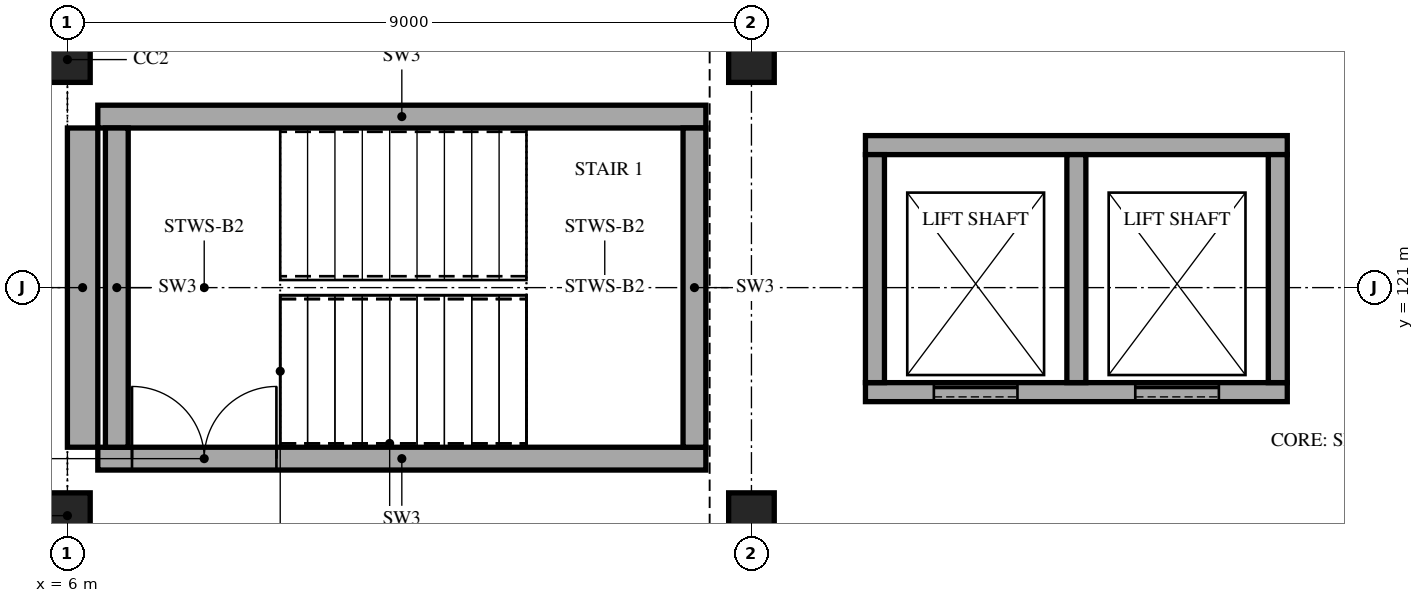
"""IFC4 building model, lengths in metres.
Left out: names, types, materials, properties, quantities, classifications, styles, units other than length and angle.
Written with IfcOpenShell. Run it as: python <this file> out.ifc"""

import sys

from ifc_helpers import new_model, si_unit, direction, frame, frame_2d, origin, origin_2d, place, context, subcontext, project, spatial, rectangle, extrude, element, fill, save


model = new_model("IFC4")
c1 = context("Model", 3, precision=1e-05, world=origin(), true_north=direction((0.0, 1.0)))
c2 = subcontext(c1, "Body", "Model", "MODEL_VIEW")
j1 = project(units=[si_unit("LENGTHUNIT", "METRE"), si_unit("PLANEANGLEUNIT", "RADIAN")], contexts=[c1])
p1 = place(None, origin())
s1 = spatial("IfcSite", under=j1, at=p1, CompositionType="ELEMENT")
p2 = place(p1, origin())
s2 = spatial("IfcBuilding", under=s1, at=p2, CompositionType="ELEMENT")
p3 = place(p2, frame((0.0, 0.0, -8.4)))
s3 = spatial("IfcBuildingStorey", under=s2, at=p3, CompositionType="ELEMENT", Elevation=-8.4)
for number, where, z_axis, x_axis in (
    (1, (6.0, 118.0, 0.0), (0.0, 0.0, 1.0), (1.0, 0.0, 0.0)),
    (2, (6.0, 124.0, 0.0), (0.0, 0.0, 1.0), (1.0, 0.0, 0.0)),
    (3, (15.0, 118.0, 0.0), (0.0, 0.0, 1.0), (1.0, 0.0, 0.0)),
    (4, (15.0, 124.0, 0.0), (0.0, 0.0, 1.0), (1.0, 0.0, 0.0)),
):
    element("IfcColumn", number, at=place(p3, frame(where, z_axis=z_axis, x_axis=x_axis)), inside=s3, PredefinedType="COLUMN", context=c2, shape_type="SweptSolid", body=[
        extrude(rectangle(XDim=0.6, YDim=0.6, at=origin_2d()), origin(), (0.0, 0.0, 1.0), 4.2),
    ])
p4 = place(p3, frame((6.4, 118.75, 0.0), z_axis=(0.0, 0.0, 1.0), x_axis=(1.0, 0.0, 0.0)))
e5 = element("IfcWall", 5, at=p4, inside=s3, PredefinedType="SHEAR", context=c2, shape_type="SweptSolid", body=[
    extrude(rectangle(XDim=8.0, YDim=0.3, at=frame_2d((4.0, 0.0))), origin(), (0.0, 0.0, 1.0), 4.2),
])
p5 = place(p4, frame((0.45, 0.0, 0.0)))
e6 = element("IfcOpeningElement", 6, at=p5, cuts=e5, PredefinedType="OPENING", context=c2, shape_type="SweptSolid", body=[
    extrude(rectangle(XDim=1.9, YDim=2.1, at=frame_2d((0.95, 1.05))), frame((0.0, 0.16, 0.0), z_axis=(0.0, -1.0, 0.0), x_axis=(1.0, 0.0, 0.0)), (0.0, 0.0, 1.0), 0.32),
])
p6 = place(p3, frame((6.4, 123.25, 0.0), z_axis=(0.0, 0.0, 1.0), x_axis=(1.0, 0.0, 0.0)))
e7 = element("IfcWall", 7, at=p6, inside=s3, PredefinedType="SHEAR", context=c2, shape_type="SweptSolid", body=[
    extrude(rectangle(XDim=8.0, YDim=0.3, at=frame_2d((4.0, 0.0))), origin(), (0.0, 0.0, 1.0), 4.2),
])
for number, where, z_axis, x_axis in (
    (8, (6.65, 118.9, 0.0), (0.0, 0.0, 1.0), (0.0, 1.0, 0.0)),
    (9, (14.25, 118.9, 0.0), (0.0, 0.0, 1.0), (0.0, 1.0, 0.0)),
):
    element("IfcWall", number, at=place(p3, frame(where, z_axis=z_axis, x_axis=x_axis)), inside=s3, PredefinedType="SHEAR", context=c2, shape_type="SweptSolid", body=[
        extrude(rectangle(XDim=4.2, YDim=0.3, at=frame_2d((2.1, 0.0))), origin(), (0.0, 0.0, 1.0), 4.2),
    ])
p7 = place(p3, frame((16.5, 119.625, 0.0), z_axis=(0.0, 0.0, 1.0), x_axis=(1.0, 0.0, 0.0)))
e10 = element("IfcWall", 10, at=p7, inside=s3, PredefinedType="SHEAR", context=c2, shape_type="SweptSolid", body=[
    extrude(rectangle(XDim=5.55, YDim=0.25, at=frame_2d((2.775, 0.0))), origin(), (0.0, 0.0, 1.0), 4.2),
])
p8 = place(p7, frame((0.9, 0.0, 0.0)))
e11 = element("IfcOpeningElement", 11, at=p8, cuts=e10, PredefinedType="OPENING", context=c2, shape_type="SweptSolid", body=[
    extrude(rectangle(XDim=1.1, YDim=2.1, at=frame_2d((0.55, 1.05))), frame((0.0, 0.135, 0.0), z_axis=(0.0, -1.0, 0.0), x_axis=(1.0, 0.0, 0.0)), (0.0, 0.0, 1.0), 0.27),
])
p9 = place(p7, frame((3.55, 0.0, 0.0)))
e12 = element("IfcOpeningElement", 12, at=p9, cuts=e10, PredefinedType="OPENING", context=c2, shape_type="SweptSolid", body=[
    extrude(rectangle(XDim=1.1, YDim=2.1, at=frame_2d((0.55, 1.05))), frame((0.0, 0.135, 0.0), z_axis=(0.0, -1.0, 0.0), x_axis=(1.0, 0.0, 0.0)), (0.0, 0.0, 1.0), 0.27),
])
p10 = place(p3, frame((16.5, 122.875, 0.0), z_axis=(0.0, 0.0, 1.0), x_axis=(1.0, 0.0, 0.0)))
e13 = element("IfcWall", 13, at=p10, inside=s3, PredefinedType="SHEAR", context=c2, shape_type="SweptSolid", body=[
    extrude(rectangle(XDim=5.55, YDim=0.25, at=frame_2d((2.775, 0.0))), origin(), (0.0, 0.0, 1.0), 4.2),
])
for number, where, z_axis, x_axis in (
    (14, (16.625, 119.75, 0.0), (0.0, 0.0, 1.0), (0.0, 1.0, 0.0)),
    (15, (21.925, 119.75, 0.0), (0.0, 0.0, 1.0), (0.0, 1.0, 0.0)),
    (16, (19.275, 119.75, 0.0), (0.0, 0.0, 1.0), (0.0, 1.0, 0.0)),
):
    element("IfcWall", number, at=place(p3, frame(where, z_axis=z_axis, x_axis=x_axis)), inside=s3, PredefinedType="SHEAR", context=c2, shape_type="SweptSolid", body=[
        extrude(rectangle(XDim=3.0, YDim=0.25, at=frame_2d((1.5, 0.0))), origin(), (0.0, 0.0, 1.0), 4.2),
    ])
p11 = place(p3, frame((6.2, 118.9, 0.0), z_axis=(0.0, 0.0, 1.0), x_axis=(0.0, 1.0, 0.0)))
e17 = element("IfcWall", 17, at=p11, inside=s3, PredefinedType="SOLIDWALL", context=c2, shape_type="SweptSolid", body=[
    extrude(rectangle(XDim=4.2, YDim=0.4, at=frame_2d((2.1, 0.0))), origin(), (0.0, 0.0, 1.0), 4.2),
])
p12 = place(p5, origin())
e18 = element("IfcDoor", 18, at=p12, inside=s3, OperationType="DOUBLE_DOOR_SINGLE_SWING", PredefinedType="NOTDEFINED", context=c2, shape_type="SweptSolid", body=[
    extrude(rectangle(XDim=1.9, YDim=2.1, at=frame_2d((0.95, 1.05))), frame((0.0, 0.025, 0.0), z_axis=(0.0, -1.0, 0.0), x_axis=(1.0, 0.0, 0.0)), (0.0, 0.0, 1.0), 0.05),
])
fill(e6, e18)
p13 = place(p8, origin())
e19 = element("IfcDoor", 19, at=p13, inside=s3, OperationType="DOUBLE_DOOR_SLIDING", PredefinedType="NOTDEFINED", context=c2, shape_type="SweptSolid", body=[
    extrude(rectangle(XDim=1.1, YDim=2.1, at=frame_2d((0.55, 1.05))), frame((0.0, 0.025, 0.0), z_axis=(0.0, -1.0, 0.0), x_axis=(1.0, 0.0, 0.0)), (0.0, 0.0, 1.0), 0.05),
])
fill(e11, e19)
p14 = place(p9, origin())
e20 = element("IfcDoor", 20, at=p14, inside=s3, OperationType="DOUBLE_DOOR_SLIDING", PredefinedType="NOTDEFINED", context=c2, shape_type="SweptSolid", body=[
    extrude(rectangle(XDim=1.1, YDim=2.1, at=frame_2d((0.55, 1.05))), frame((0.0, 0.025, 0.0), z_axis=(0.0, -1.0, 0.0), x_axis=(1.0, 0.0, 0.0)), (0.0, 0.0, 1.0), 0.05),
])
fill(e12, e20)
save(model, sys.argv[1])
